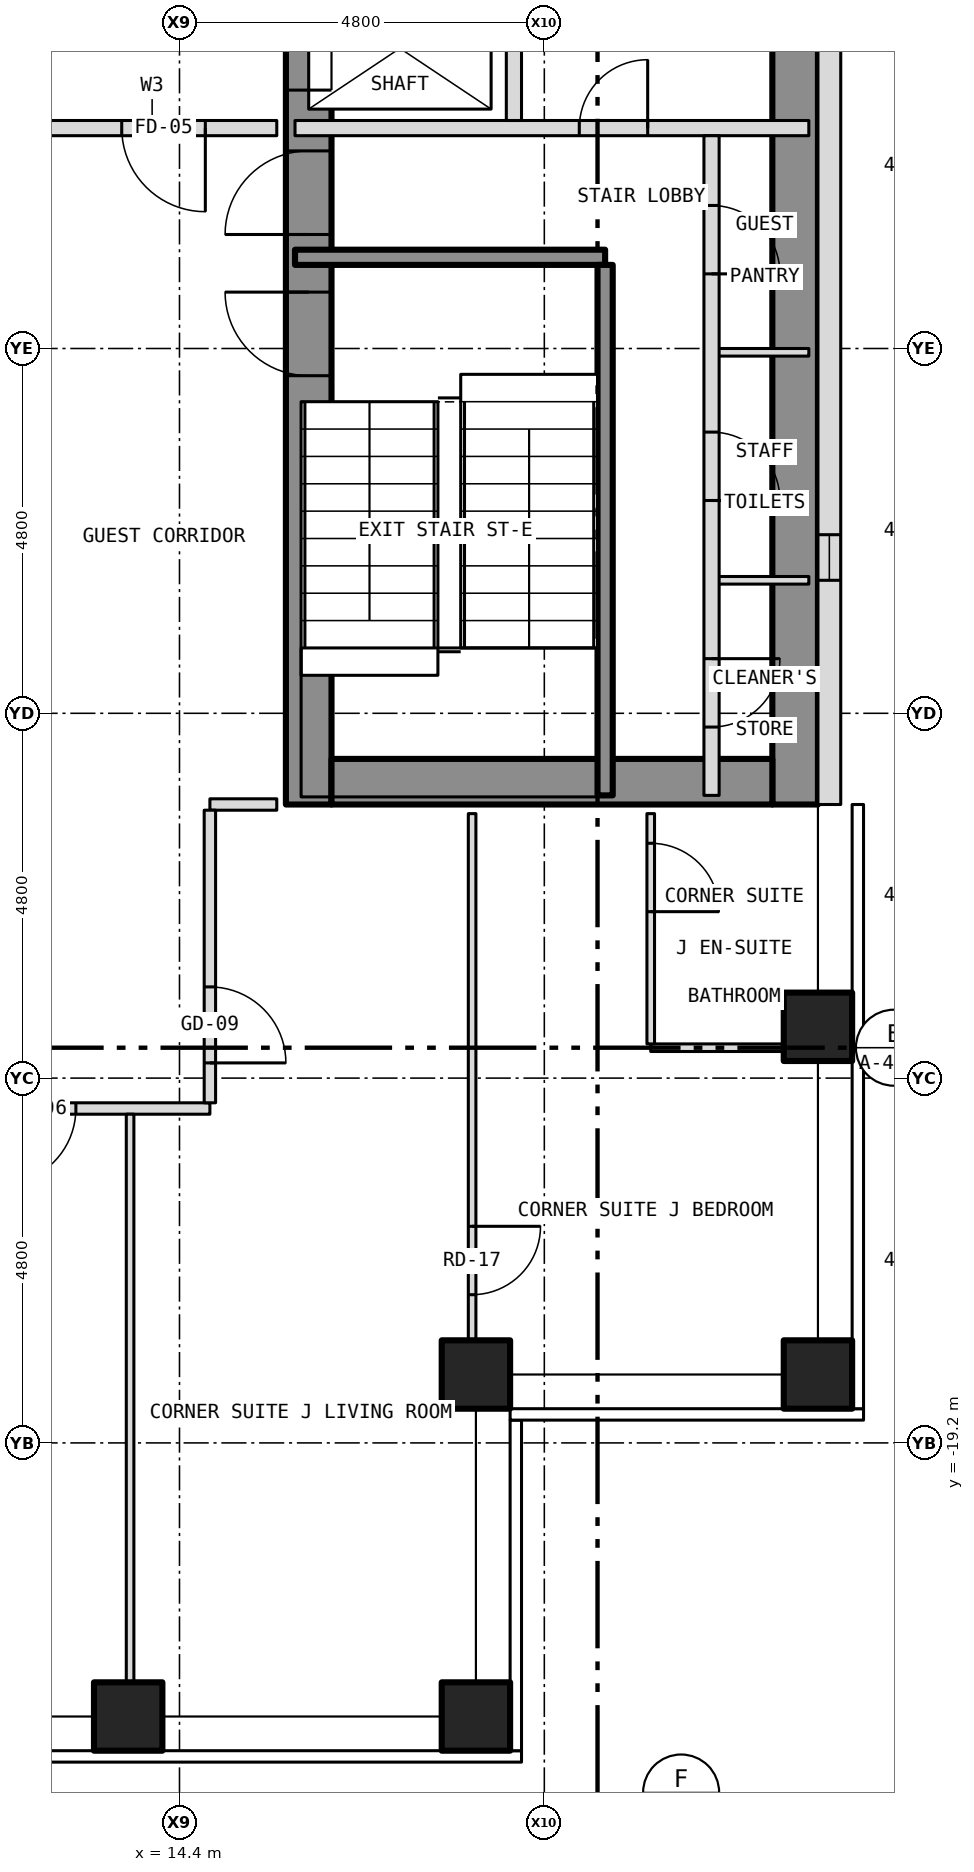
"""IFC4 building model, lengths in metres.
Left out: names, types, materials, properties, quantities, classifications, styles, units other than length and angle.
Written with IfcOpenShell. Run it as: python <this file> out.ifc"""

import sys

from ifc_helpers import new_model, si_unit, direction, frame, frame_2d, origin, origin_2d, place, context, subcontext, project, spatial, rectangle, hollow_rectangle, extrude, element, fill, save


model = new_model("IFC4")
c1 = context("Model", 3, precision=1e-05, world=origin(), true_north=direction((0.0, 1.0)))
c2 = subcontext(c1, "Body", "Model", "MODEL_VIEW")
j1 = project(units=[si_unit("LENGTHUNIT", "METRE"), si_unit("PLANEANGLEUNIT", "RADIAN")], contexts=[c1])
p1 = place(None, origin())
s1 = spatial("IfcSite", under=j1, at=p1, CompositionType="ELEMENT")
p2 = place(p1, origin())
s2 = spatial("IfcBuilding", under=s1, at=p2, CompositionType="ELEMENT")
p3 = place(p2, frame((0.0, 0.0, 106.5)))
s3 = spatial("IfcBuildingStorey", under=s2, at=p3, CompositionType="ELEMENT", Elevation=106.5)
for number, where, z_axis, x_axis in (
    (1, (13.725, -22.8, -0.15), (0.0, 0.0, 1.0), (1.0, 0.0, 0.0)),
    (2, (18.3, -22.8, -0.15), (0.0, 0.0, 1.0), (1.0, 0.0, 0.0)),
    (3, (22.8, -18.3, -0.15), (0.0, 0.0, 1.0), (1.0, 0.0, 0.0)),
    (4, (22.8, -13.725, -0.15), (0.0, 0.0, 1.0), (1.0, 0.0, 0.0)),
    (5, (18.3, -18.3, -0.15), (0.0, 0.0, 1.0), (1.0, 0.0, 0.0)),
):
    element("IfcColumn", number, at=place(p3, frame(where, z_axis=z_axis, x_axis=x_axis)), inside=s3, PredefinedType="COLUMN", context=c2, shape_type="SweptSolid", body=[
        extrude(hollow_rectangle(XDim=0.9, YDim=0.9, WallThickness=0.05, at=origin_2d()), origin(), (0.0, 0.0, 1.0), 3.5),
    ])
p4 = place(p3, frame((16.1, -10.8, 0.0), z_axis=(0.0, 0.0, 1.0), x_axis=(0.0, 1.0, 0.0)))
e6 = element("IfcWall", 6, at=p4, inside=s3, PredefinedType="SHEAR", context=c2, shape_type="SweptSolid", body=[
    extrude(rectangle(XDim=21.6, YDim=0.6, at=frame_2d((10.8, 0.0))), origin(), (0.0, 0.0, 1.0), 3.25),
])
p5 = place(p4, frame((9.4, 0.0, 0.0)))
e7 = element("IfcOpeningElement", 7, at=p5, cuts=e6, PredefinedType="OPENING", context=c2, shape_type="SweptSolid", body=[
    extrude(rectangle(XDim=1.1, YDim=2.1, at=frame_2d((0.55, 1.05))), frame((0.0, 0.312, 0.0), z_axis=(0.0, -1.0, 0.0), x_axis=(1.0, 0.0, 0.0)), (0.0, 0.0, 1.0), 0.624),
])
p6 = place(p4, frame((11.5, 0.0, 0.0)))
e8 = element("IfcOpeningElement", 8, at=p6, cuts=e6, PredefinedType="OPENING", context=c2, shape_type="SweptSolid", body=[
    extrude(rectangle(XDim=1.1, YDim=2.1, at=frame_2d((0.55, 1.05))), frame((0.0, 0.312, 0.0), z_axis=(0.0, -1.0, 0.0), x_axis=(1.0, 0.0, 0.0)), (0.0, 0.0, 1.0), 0.624),
])
p7 = place(p4, frame((13.6, 0.0, 0.0)))
e9 = element("IfcOpeningElement", 9, at=p7, cuts=e6, PredefinedType="OPENING", context=c2, shape_type="SweptSolid", body=[
    extrude(rectangle(XDim=1.1, YDim=2.1, at=frame_2d((0.55, 1.05))), frame((0.0, 0.312, 0.0), z_axis=(0.0, -1.0, 0.0), x_axis=(1.0, 0.0, 0.0)), (0.0, 0.0, 1.0), 0.624),
])
p8 = place(p4, frame((15.7, 0.0, 0.0)))
e10 = element("IfcOpeningElement", 10, at=p8, cuts=e6, PredefinedType="OPENING", context=c2, shape_type="SweptSolid", body=[
    extrude(rectangle(XDim=1.1, YDim=2.1, at=frame_2d((0.55, 1.05))), frame((0.0, 0.312, 0.0), z_axis=(0.0, -1.0, 0.0), x_axis=(1.0, 0.0, 0.0)), (0.0, 0.0, 1.0), 0.624),
])
p9 = place(p4, frame((17.8, 0.0, 0.0)))
e11 = element("IfcOpeningElement", 11, at=p9, cuts=e6, PredefinedType="OPENING", context=c2, shape_type="SweptSolid", body=[
    extrude(rectangle(XDim=1.1, YDim=2.1, at=frame_2d((0.55, 1.05))), frame((0.0, 0.312, 0.0), z_axis=(0.0, -1.0, 0.0), x_axis=(1.0, 0.0, 0.0)), (0.0, 0.0, 1.0), 0.624),
])
p10 = place(p4, frame((5.642, 0.0, 0.0)))
e12 = element("IfcOpeningElement", 12, at=p10, cuts=e6, PredefinedType="OPENING", context=c2, shape_type="SweptSolid", body=[
    extrude(rectangle(XDim=1.1, YDim=2.1, at=frame_2d((0.55, 1.05))), frame((0.0, 0.312, 0.0), z_axis=(0.0, -1.0, 0.0), x_axis=(1.0, 0.0, 0.0)), (0.0, 0.0, 1.0), 0.624),
])
p11 = place(p4, frame((7.5, 0.0, 0.0)))
e13 = element("IfcOpeningElement", 13, at=p11, cuts=e6, PredefinedType="OPENING", context=c2, shape_type="SweptSolid", body=[
    extrude(rectangle(XDim=1.1, YDim=2.1, at=frame_2d((0.55, 1.05))), frame((0.0, 0.312, 0.0), z_axis=(0.0, -1.0, 0.0), x_axis=(1.0, 0.0, 0.0)), (0.0, 0.0, 1.0), 0.624),
])
p12 = place(p3, frame((22.5, -10.8, 0.0), z_axis=(0.0, 0.0, 1.0), x_axis=(0.0, 1.0, 0.0)))
e14 = element("IfcWall", 14, at=p12, inside=s3, PredefinedType="SHEAR", context=c2, shape_type="SweptSolid", body=[
    extrude(rectangle(XDim=21.6, YDim=0.6, at=frame_2d((10.8, 0.0))), origin(), (0.0, 0.0, 1.0), 3.25),
])
p13 = place(p3, frame((16.4, -10.5, 0.0), z_axis=(0.0, 0.0, 1.0), x_axis=(1.0, 0.0, 0.0)))
e15 = element("IfcWall", 15, at=p13, inside=s3, PredefinedType="SHEAR", context=c2, shape_type="SweptSolid", body=[
    extrude(rectangle(XDim=5.8, YDim=0.6, at=frame_2d((2.9, 0.0))), origin(), (0.0, 0.0, 1.0), 3.25),
])
p14 = place(p3, frame((22.95, -10.8, 0.0), z_axis=(0.0, 0.0, 1.0), x_axis=(0.0, 1.0, 0.0)))
e16 = element("IfcWall", 16, at=p14, inside=s3, PredefinedType="SOLIDWALL", context=c2, shape_type="SweptSolid", body=[
    extrude(rectangle(XDim=21.6, YDim=0.3, at=frame_2d((10.8, 0.0))), origin(), (0.0, 0.0, 1.0), 3.5),
])
p15 = place(p14, frame((2.95, 0.0, 1.0)))
e17 = element("IfcOpeningElement", 17, at=p15, cuts=e16, PredefinedType="OPENING", context=c2, shape_type="SweptSolid", body=[
    extrude(rectangle(XDim=0.6, YDim=1.5, at=frame_2d((0.3, 0.75))), frame((0.0, 0.162, 0.0), z_axis=(0.0, -1.0, 0.0), x_axis=(1.0, 0.0, 0.0)), (0.0, 0.0, 1.0), 0.324),
])
p16 = place(p3, frame((-14.8, -14.8, 0.0), z_axis=(0.0, 0.0, 1.0), x_axis=(1.0, 0.0, 0.0)))
e18 = element("IfcWall", 18, at=p16, inside=s3, PredefinedType="PARTITIONING", context=c2, shape_type="SweptSolid", body=[
    extrude(rectangle(XDim=29.6, YDim=0.15, at=frame_2d((14.8, 0.0))), origin(), (0.0, 0.0, 1.0), 3.35),
])
p17 = place(p16, frame((2.634, 0.0, 0.0)))
e19 = element("IfcOpeningElement", 19, at=p17, cuts=e18, PredefinedType="OPENING", context=c2, shape_type="SweptSolid", body=[
    extrude(rectangle(XDim=1.0, YDim=2.1, at=frame_2d((0.5, 1.05))), frame((0.0, 0.087, 0.0), z_axis=(0.0, -1.0, 0.0), x_axis=(1.0, 0.0, 0.0)), (0.0, 0.0, 1.0), 0.174),
])
p18 = place(p16, frame((20.362, 0.0, 0.0)))
e20 = element("IfcOpeningElement", 20, at=p18, cuts=e18, PredefinedType="OPENING", context=c2, shape_type="SweptSolid", body=[
    extrude(rectangle(XDim=1.0, YDim=2.1, at=frame_2d((0.5, 1.05))), frame((0.0, 0.087, 0.0), z_axis=(0.0, -1.0, 0.0), x_axis=(1.0, 0.0, 0.0)), (0.0, 0.0, 1.0), 0.174),
])
p19 = place(p16, frame((26.837, 0.0, 0.0)))
e21 = element("IfcOpeningElement", 21, at=p19, cuts=e18, PredefinedType="OPENING", context=c2, shape_type="SweptSolid", body=[
    extrude(rectangle(XDim=1.0, YDim=2.1, at=frame_2d((0.5, 1.05))), frame((0.0, 0.087, 0.0), z_axis=(0.0, -1.0, 0.0), x_axis=(1.0, 0.0, 0.0)), (0.0, 0.0, 1.0), 0.174),
])
p20 = place(p3, frame((20.6, -14.0, 0.0), z_axis=(0.0, 0.0, 1.0), x_axis=(1.0, 0.0, 0.0)))
e22 = element("IfcWall", 22, at=p20, inside=s3, PredefinedType="PARTITIONING", context=c2, shape_type="SweptSolid", body=[
    extrude(rectangle(XDim=2.08, YDim=0.1, at=frame_2d((1.04, 0.0))), origin(), (0.0, 0.0, 1.0), 3.35),
])
p21 = place(p3, frame((14.8, -10.8, 0.0), z_axis=(0.0, 0.0, 1.0), x_axis=(1.0, 0.0, 0.0)))
e23 = element("IfcWall", 23, at=p21, inside=s3, PredefinedType="PARTITIONING", context=c2, shape_type="SweptSolid", body=[
    extrude(rectangle(XDim=0.88, YDim=0.15, at=frame_2d((0.44, 0.0))), origin(), (0.0, 0.0, 1.0), 3.35),
])
for number, where, z_axis, x_axis in (
    (24, (21.4, -7.85, 0.0), (0.0, 0.0, 1.0), (1.0, 0.0, 0.0)),
    (25, (21.4, -4.85, 0.0), (0.0, 0.0, 1.0), (1.0, 0.0, 0.0)),
):
    element("IfcWall", number, at=place(p3, frame(where, z_axis=z_axis, x_axis=x_axis)), inside=s3, PredefinedType="PARTITIONING", context=c2, shape_type="SweptSolid", body=[
        extrude(rectangle(XDim=1.28, YDim=0.1, at=frame_2d((0.64, 0.0))), origin(), (0.0, 0.0, 1.0), 3.25),
    ])
p22 = place(p3, frame((15.92, -3.6, 0.0), z_axis=(0.0, 0.0, 1.0), x_axis=(1.0, 0.0, 0.0)))
e26 = element("IfcWall", 26, at=p22, inside=s3, PredefinedType="SHEAR", context=c2, shape_type="SweptSolid", body=[
    extrude(rectangle(XDim=4.08, YDim=0.2, at=frame_2d((2.04, 0.0))), origin(), (0.0, 0.0, 1.0), 3.25),
])
p23 = place(p3, frame((12.4, -1.9, 0.0), z_axis=(0.0, 0.0, 1.0), x_axis=(1.0, 0.0, 0.0)))
e27 = element("IfcWall", 27, at=p23, inside=s3, PredefinedType="PARTITIONING", context=c2, shape_type="SweptSolid", body=[
    extrude(rectangle(XDim=3.28, YDim=0.2, at=frame_2d((1.64, 0.0))), origin(), (0.0, 0.0, 1.0), 3.35),
])
p24 = place(p23, frame((1.24, 0.0, 0.0)))
e28 = element("IfcOpeningElement", 28, at=p24, cuts=e27, PredefinedType="OPENING", context=c2, shape_type="SweptSolid", body=[
    extrude(rectangle(XDim=1.1, YDim=2.1, at=frame_2d((0.55, 1.05))), frame((0.0, 0.112, 0.0), z_axis=(0.0, -1.0, 0.0), x_axis=(1.0, 0.0, 0.0)), (0.0, 0.0, 1.0), 0.224),
])
p25 = place(p3, frame((15.92, -1.9, 0.0), z_axis=(0.0, 0.0, 1.0), x_axis=(1.0, 0.0, 0.0)))
e29 = element("IfcWall", 29, at=p25, inside=s3, PredefinedType="PARTITIONING", context=c2, shape_type="SweptSolid", body=[
    extrude(rectangle(XDim=6.76, YDim=0.2, at=frame_2d((3.38, 0.0))), origin(), (0.0, 0.0, 1.0), 3.25),
])
p26 = place(p25, frame((3.74, 0.0, 0.0)))
e30 = element("IfcOpeningElement", 30, at=p26, cuts=e29, PredefinedType="OPENING", context=c2, shape_type="SweptSolid", body=[
    extrude(rectangle(XDim=0.9, YDim=2.1, at=frame_2d((0.45, 1.05))), frame((0.0, 0.112, 0.0), z_axis=(0.0, -1.0, 0.0), x_axis=(1.0, 0.0, 0.0)), (0.0, 0.0, 1.0), 0.224),
])
p27 = place(p3, frame((13.75, -22.68, 0.0), z_axis=(0.0, 0.0, 1.0), x_axis=(0.0, 1.0, 0.0)))
e31 = element("IfcWall", 31, at=p27, inside=s3, PredefinedType="PARTITIONING", context=c2, shape_type="SweptSolid", body=[
    extrude(rectangle(XDim=7.805, YDim=0.1, at=frame_2d((3.902, 0.0))), origin(), (0.0, 0.0, 1.0), 3.35),
])
p28 = place(p3, frame((14.8, -14.725, 0.0), z_axis=(0.0, 0.0, 1.0), x_axis=(0.0, 1.0, 0.0)))
e32 = element("IfcWall", 32, at=p28, inside=s3, PredefinedType="PARTITIONING", context=c2, shape_type="SweptSolid", body=[
    extrude(rectangle(XDim=3.85, YDim=0.15, at=frame_2d((1.925, 0.0))), origin(), (0.0, 0.0, 1.0), 3.35),
])
p29 = place(p28, frame((0.525, 0.0, 0.0)))
e33 = element("IfcOpeningElement", 33, at=p29, cuts=e32, PredefinedType="OPENING", context=c2, shape_type="SweptSolid", body=[
    extrude(rectangle(XDim=1.0, YDim=2.1, at=frame_2d((0.5, 1.05))), frame((0.0, 0.087, 0.0), z_axis=(0.0, -1.0, 0.0), x_axis=(1.0, 0.0, 0.0)), (0.0, 0.0, 1.0), 0.174),
])
p30 = place(p3, frame((18.25, -18.191, 0.0), z_axis=(0.0, 0.0, 1.0), x_axis=(0.0, 1.0, 0.0)))
e34 = element("IfcWall", 34, at=p30, inside=s3, PredefinedType="PARTITIONING", context=c2, shape_type="SweptSolid", body=[
    extrude(rectangle(XDim=7.271, YDim=0.1, at=frame_2d((3.635, 0.0))), origin(), (0.0, 0.0, 1.0), 3.35),
])
p31 = place(p30, frame((0.941, 0.0, 0.0)))
e35 = element("IfcOpeningElement", 35, at=p31, cuts=e34, PredefinedType="OPENING", context=c2, shape_type="SweptSolid", body=[
    extrude(rectangle(XDim=0.9, YDim=2.1, at=frame_2d((0.45, 1.05))), frame((0.0, 0.062, 0.0), z_axis=(0.0, -1.0, 0.0), x_axis=(1.0, 0.0, 0.0)), (0.0, 0.0, 1.0), 0.124),
])
p32 = place(p3, frame((18.8, -1.8, 0.0), z_axis=(0.0, 0.0, 1.0), x_axis=(0.0, 1.0, 0.0)))
e36 = element("IfcWall", 36, at=p32, inside=s3, PredefinedType="PARTITIONING", context=c2, shape_type="SweptSolid", body=[
    extrude(rectangle(XDim=12.48, YDim=0.2, at=frame_2d((6.24, 0.0))), origin(), (0.0, 0.0, 1.0), 3.25),
])
p33 = place(p3, frame((20.0, -10.68, 0.0), z_axis=(0.0, 0.0, 1.0), x_axis=(0.0, 1.0, 0.0)))
e37 = element("IfcWall", 37, at=p33, inside=s3, PredefinedType="SHEAR", context=c2, shape_type="SweptSolid", body=[
    extrude(rectangle(XDim=6.98, YDim=0.2, at=frame_2d((3.49, 0.0))), origin(), (0.0, 0.0, 1.0), 3.25),
])
p34 = place(p3, frame((20.6, -13.95, 0.0), z_axis=(0.0, 0.0, 1.0), x_axis=(0.0, 1.0, 0.0)))
e38 = element("IfcWall", 38, at=p34, inside=s3, PredefinedType="PARTITIONING", context=c2, shape_type="SweptSolid", body=[
    extrude(rectangle(XDim=3.03, YDim=0.1, at=frame_2d((1.515, 0.0))), origin(), (0.0, 0.0, 1.0), 3.35),
])
p35 = place(p34, frame((1.74, 0.0, 0.0)))
e39 = element("IfcOpeningElement", 39, at=p35, cuts=e38, PredefinedType="OPENING", context=c2, shape_type="SweptSolid", body=[
    extrude(rectangle(XDim=0.9, YDim=2.1, at=frame_2d((0.45, 1.05))), frame((0.0, 0.062, 0.0), z_axis=(0.0, -1.0, 0.0), x_axis=(1.0, 0.0, 0.0)), (0.0, 0.0, 1.0), 0.124),
])
p36 = place(p3, frame((21.4, -10.68, 0.0), z_axis=(0.0, 0.0, 1.0), x_axis=(0.0, 1.0, 0.0)))
e40 = element("IfcWall", 40, at=p36, inside=s3, PredefinedType="PARTITIONING", context=c2, shape_type="SweptSolid", body=[
    extrude(rectangle(XDim=8.68, YDim=0.2, at=frame_2d((4.34, 0.0))), origin(), (0.0, 0.0, 1.0), 3.25),
])
p37 = place(p36, frame((0.899, 0.0, 0.0)))
e41 = element("IfcOpeningElement", 41, at=p37, cuts=e40, PredefinedType="OPENING", context=c2, shape_type="SweptSolid", body=[
    extrude(rectangle(XDim=0.9, YDim=2.1, at=frame_2d((0.45, 1.05))), frame((0.0, 0.112, 0.0), z_axis=(0.0, -1.0, 0.0), x_axis=(1.0, 0.0, 0.0)), (0.0, 0.0, 1.0), 0.224),
])
p38 = place(p36, frame((3.88, 0.0, 0.0)))
e42 = element("IfcOpeningElement", 42, at=p38, cuts=e40, PredefinedType="OPENING", context=c2, shape_type="SweptSolid", body=[
    extrude(rectangle(XDim=0.9, YDim=2.1, at=frame_2d((0.45, 1.05))), frame((0.0, 0.112, 0.0), z_axis=(0.0, -1.0, 0.0), x_axis=(1.0, 0.0, 0.0)), (0.0, 0.0, 1.0), 0.224),
])
p39 = place(p36, frame((6.862, 0.0, 0.0)))
e43 = element("IfcOpeningElement", 43, at=p39, cuts=e40, PredefinedType="OPENING", context=c2, shape_type="SweptSolid", body=[
    extrude(rectangle(XDim=0.9, YDim=2.1, at=frame_2d((0.45, 1.05))), frame((0.0, 0.112, 0.0), z_axis=(0.0, -1.0, 0.0), x_axis=(1.0, 0.0, 0.0)), (0.0, 0.0, 1.0), 0.224),
])
p40 = place(p15, origin())
e44 = element("IfcWindow", 44, at=p40, inside=s3, PartitioningType="SINGLE_PANEL", PredefinedType="WINDOW", context=c2, shape_type="SweptSolid", body=[
    extrude(rectangle(XDim=0.6, YDim=1.5, at=frame_2d((0.3, 0.75))), frame((0.0, -0.06, 0.0), z_axis=(0.0, -1.0, 0.0), x_axis=(1.0, 0.0, 0.0)), (0.0, 0.0, 1.0), 0.06),
])
fill(e17, e44)
p41 = place(p5, origin())
e45 = element("IfcDoor", 45, at=p41, inside=s3, OperationType="SLIDING_TO_LEFT", PredefinedType="DOOR", context=c2, shape_type="SweptSolid", body=[
    extrude(rectangle(XDim=1.1, YDim=2.1, at=frame_2d((0.55, 1.05))), frame((0.0, 0.025, 0.0), z_axis=(0.0, -1.0, 0.0), x_axis=(1.0, 0.0, 0.0)), (0.0, 0.0, 1.0), 0.05),
])
fill(e7, e45)
p42 = place(p10, origin())
e46 = element("IfcDoor", 46, at=p42, inside=s3, OperationType="SINGLE_SWING_RIGHT", PredefinedType="DOOR", context=c2, shape_type="SweptSolid", body=[
    extrude(rectangle(XDim=1.1, YDim=2.1, at=frame_2d((0.55, 1.05))), frame((0.0, 0.025, 0.0), z_axis=(0.0, -1.0, 0.0), x_axis=(1.0, 0.0, 0.0)), (0.0, 0.0, 1.0), 0.05),
])
fill(e12, e46)
p43 = place(p11, origin())
e47 = element("IfcDoor", 47, at=p43, inside=s3, OperationType="SINGLE_SWING_LEFT", PredefinedType="DOOR", context=c2, shape_type="SweptSolid", body=[
    extrude(rectangle(XDim=1.1, YDim=2.1, at=frame_2d((0.55, 1.05))), frame((0.0, 0.025, 0.0), z_axis=(0.0, -1.0, 0.0), x_axis=(1.0, 0.0, 0.0)), (0.0, 0.0, 1.0), 0.05),
])
fill(e13, e47)
p44 = place(p37, origin())
e48 = element("IfcDoor", 48, at=p44, inside=s3, OperationType="SINGLE_SWING_RIGHT", PredefinedType="DOOR", context=c2, shape_type="SweptSolid", body=[
    extrude(rectangle(XDim=0.9, YDim=2.1, at=frame_2d((0.45, 1.05))), frame((0.0, 0.025, 0.0), z_axis=(0.0, -1.0, 0.0), x_axis=(1.0, 0.0, 0.0)), (0.0, 0.0, 1.0), 0.05),
])
fill(e41, e48)
p45 = place(p38, origin())
e49 = element("IfcDoor", 49, at=p45, inside=s3, OperationType="SINGLE_SWING_LEFT", PredefinedType="DOOR", context=c2, shape_type="SweptSolid", body=[
    extrude(rectangle(XDim=0.9, YDim=2.1, at=frame_2d((0.45, 1.05))), frame((0.0, 0.025, 0.0), z_axis=(0.0, -1.0, 0.0), x_axis=(1.0, 0.0, 0.0)), (0.0, 0.0, 1.0), 0.05),
])
fill(e42, e49)
p46 = place(p39, origin())
e50 = element("IfcDoor", 50, at=p46, inside=s3, OperationType="SINGLE_SWING_LEFT", PredefinedType="DOOR", context=c2, shape_type="SweptSolid", body=[
    extrude(rectangle(XDim=0.9, YDim=2.1, at=frame_2d((0.45, 1.05))), frame((0.0, 0.025, 0.0), z_axis=(0.0, -1.0, 0.0), x_axis=(1.0, 0.0, 0.0)), (0.0, 0.0, 1.0), 0.05),
])
fill(e43, e50)
p47 = place(p26, origin())
e51 = element("IfcDoor", 51, at=p47, inside=s3, OperationType="SINGLE_SWING_RIGHT", PredefinedType="DOOR", context=c2, shape_type="SweptSolid", body=[
    extrude(rectangle(XDim=0.9, YDim=2.1, at=frame_2d((0.45, 1.05))), frame((0.0, 0.025, 0.0), z_axis=(0.0, -1.0, 0.0), x_axis=(1.0, 0.0, 0.0)), (0.0, 0.0, 1.0), 0.05),
])
fill(e30, e51)
p48 = place(p24, origin())
e52 = element("IfcDoor", 52, at=p48, inside=s3, OperationType="SINGLE_SWING_RIGHT", PredefinedType="DOOR", context=c2, shape_type="SweptSolid", body=[
    extrude(rectangle(XDim=1.1, YDim=2.1, at=frame_2d((0.55, 1.05))), frame((0.0, 0.025, 0.0), z_axis=(0.0, -1.0, 0.0), x_axis=(1.0, 0.0, 0.0)), (0.0, 0.0, 1.0), 0.05),
])
fill(e28, e52)
p49 = place(p19, origin())
e53 = element("IfcDoor", 53, at=p49, inside=s3, OperationType="SINGLE_SWING_LEFT", PredefinedType="DOOR", context=c2, shape_type="SweptSolid", body=[
    extrude(rectangle(XDim=1.0, YDim=2.1, at=frame_2d((0.5, 1.05))), frame((0.0, 0.025, 0.0), z_axis=(0.0, -1.0, 0.0), x_axis=(1.0, 0.0, 0.0)), (0.0, 0.0, 1.0), 0.05),
])
fill(e21, e53)
p50 = place(p29, origin())
e54 = element("IfcDoor", 54, at=p50, inside=s3, OperationType="SINGLE_SWING_LEFT", PredefinedType="DOOR", context=c2, shape_type="SweptSolid", body=[
    extrude(rectangle(XDim=1.0, YDim=2.1, at=frame_2d((0.5, 1.05))), frame((0.0, 0.025, 0.0), z_axis=(0.0, -1.0, 0.0), x_axis=(1.0, 0.0, 0.0)), (0.0, 0.0, 1.0), 0.05),
])
fill(e33, e54)
p51 = place(p31, origin())
e55 = element("IfcDoor", 55, at=p51, inside=s3, OperationType="SINGLE_SWING_RIGHT", PredefinedType="DOOR", context=c2, shape_type="SweptSolid", body=[
    extrude(rectangle(XDim=0.9, YDim=2.1, at=frame_2d((0.45, 1.05))), frame((0.0, 0.025, 0.0), z_axis=(0.0, -1.0, 0.0), x_axis=(1.0, 0.0, 0.0)), (0.0, 0.0, 1.0), 0.05),
])
fill(e35, e55)
p52 = place(p35, origin())
e56 = element("IfcDoor", 56, at=p52, inside=s3, OperationType="SINGLE_SWING_LEFT", PredefinedType="DOOR", context=c2, shape_type="SweptSolid", body=[
    extrude(rectangle(XDim=0.9, YDim=2.1, at=frame_2d((0.45, 1.05))), frame((0.0, 0.025, 0.0), z_axis=(0.0, -1.0, 0.0), x_axis=(1.0, 0.0, 0.0)), (0.0, 0.0, 1.0), 0.05),
])
fill(e39, e56)
save(model, sys.argv[1])
